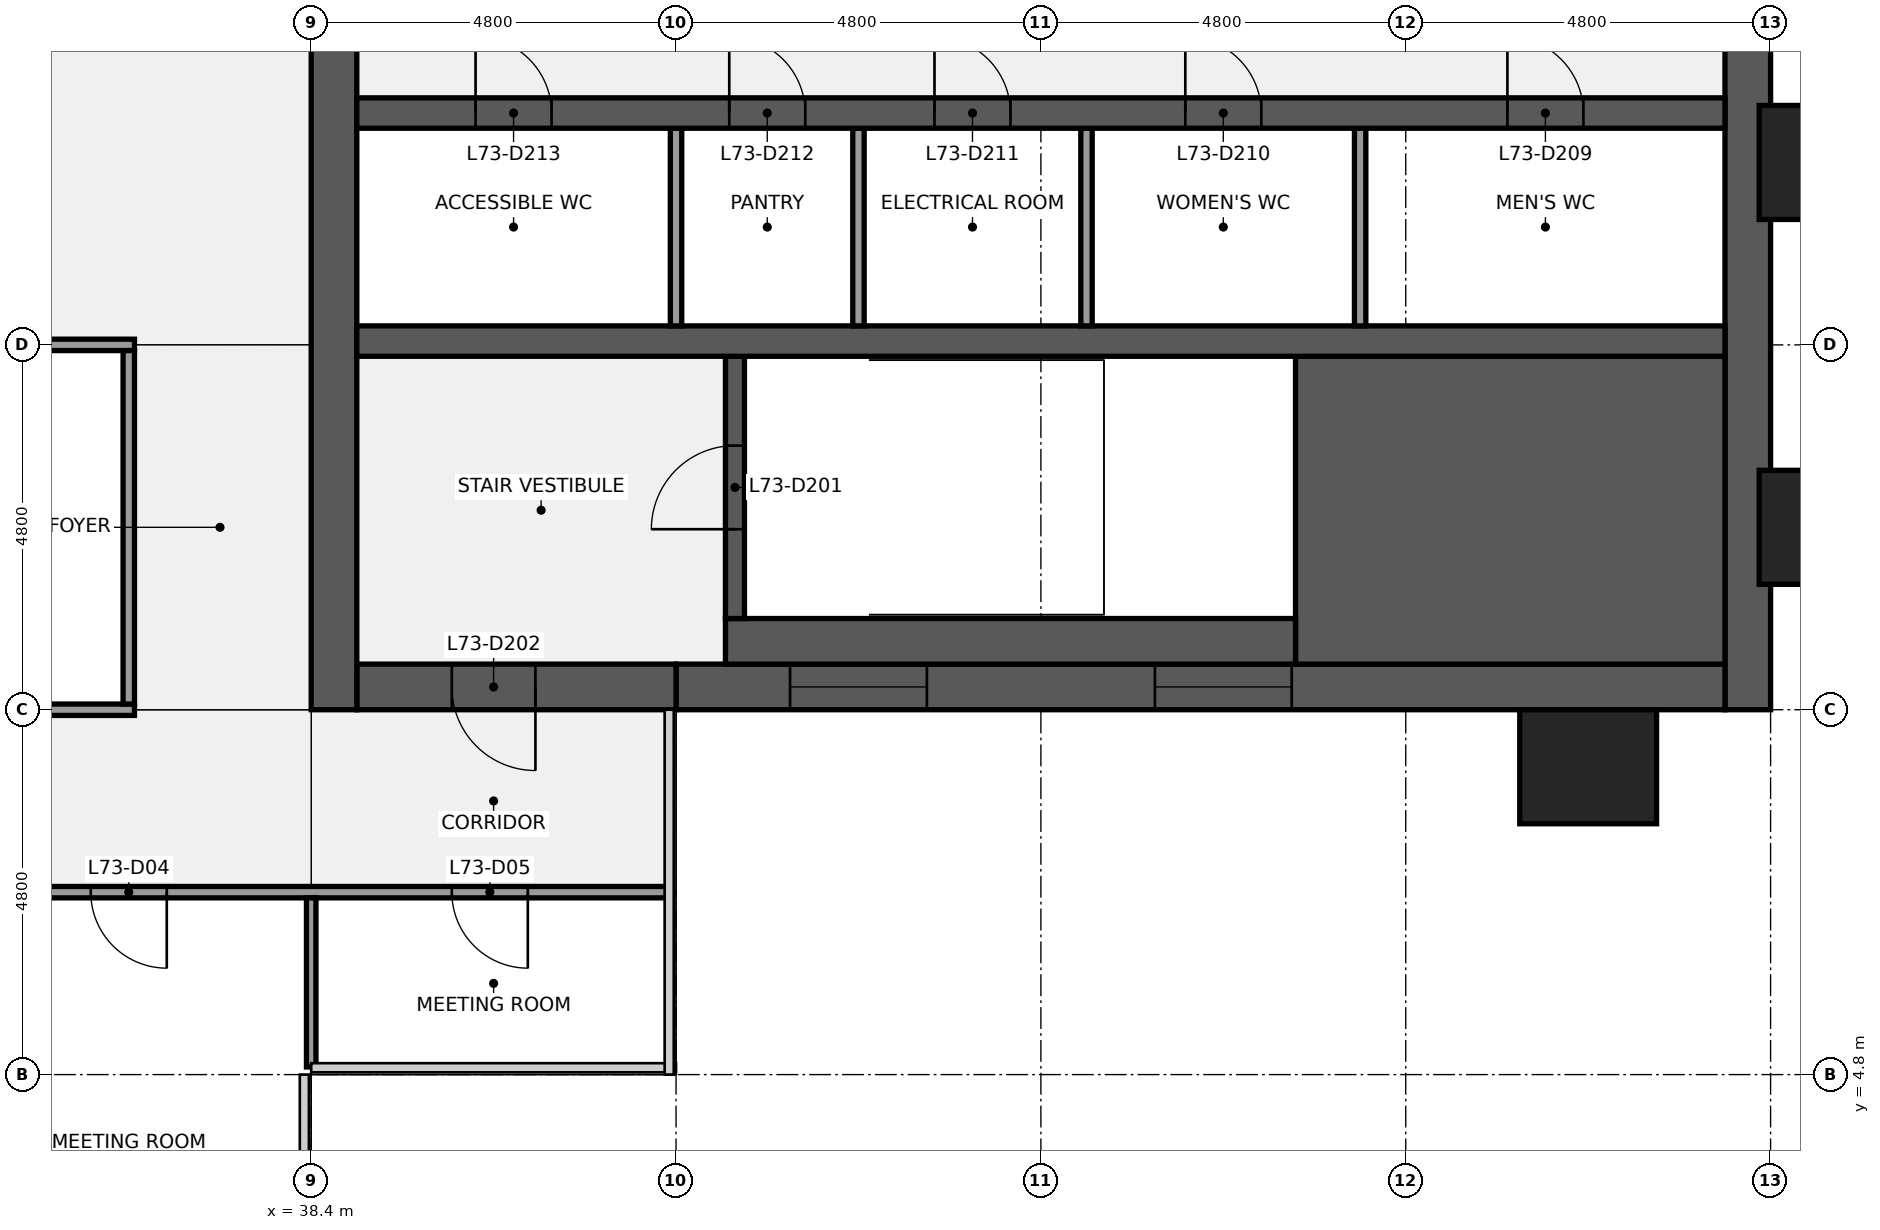
"""IFC4 building model, lengths in metres.
Left out: names, types, materials, properties, quantities, classifications, styles, units other than length and angle.
Written with IfcOpenShell. Run it as: python <this file> out.ifc"""

import sys

from ifc_helpers import new_model, si_unit, direction, frame, frame_2d, origin, origin_2d, place, context, subcontext, project, spatial, rectangle, extrude, element, fill, save


model = new_model("IFC4")
c1 = context("Model", 3, precision=1e-05, world=origin(), true_north=direction((0.0, 1.0)))
c2 = subcontext(c1, "Body", "Model", "MODEL_VIEW")
j1 = project(units=[si_unit("LENGTHUNIT", "METRE"), si_unit("PLANEANGLEUNIT", "RADIAN")], contexts=[c1])
p1 = place(None, origin())
s1 = spatial("IfcSite", under=j1, at=p1, CompositionType="ELEMENT")
p2 = place(p1, origin())
s2 = spatial("IfcBuilding", under=s1, at=p2, CompositionType="ELEMENT")
p3 = place(p2, frame((0.0, 0.0, 330.3)))
s3 = spatial("IfcBuildingStorey", under=s2, at=p3, CompositionType="ELEMENT", Elevation=330.3)
p4 = place(p3, frame((57.3, 38.4, 0.0), z_axis=(0.0, 0.0, 1.0), x_axis=(0.0, -1.0, 0.0)))
e1 = element("IfcWall", 1, at=p4, inside=s3, PredefinedType="SHEAR", context=c2, shape_type="SweptSolid", body=[
    extrude(rectangle(XDim=28.8, YDim=0.6, at=frame_2d((14.4, 0.0))), origin(), (0.0, 0.0, 1.0), 3.84),
])
p5 = place(p4, frame((18.45, 0.0, 0.9)))
e2 = element("IfcOpeningElement", 2, at=p5, cuts=e1, PredefinedType="OPENING", context=c2, shape_type="SweptSolid", body=[
    extrude(rectangle(XDim=1.5, YDim=1.5, at=frame_2d((0.75, 0.75))), frame((0.0, 0.31, 0.0), z_axis=(0.0, -1.0, 0.0), x_axis=(1.0, 0.0, 0.0)), (0.0, 0.0, 1.0), 0.62),
])
p6 = place(p4, frame((8.85, 0.0, 0.9)))
e3 = element("IfcOpeningElement", 3, at=p6, cuts=e1, PredefinedType="OPENING", context=c2, shape_type="SweptSolid", body=[
    extrude(rectangle(XDim=1.5, YDim=1.5, at=frame_2d((0.75, 0.75))), frame((0.0, 0.31, 0.0), z_axis=(0.0, -1.0, 0.0), x_axis=(1.0, 0.0, 0.0)), (0.0, 0.0, 1.0), 0.62),
])
p7 = place(p3, frame((57.0, 9.9, 0.0), z_axis=(0.0, 0.0, 1.0), x_axis=(-1.0, 0.0, 0.0)))
e4 = element("IfcWall", 4, at=p7, inside=s3, PredefinedType="SHEAR", context=c2, shape_type="SweptSolid", body=[
    extrude(rectangle(XDim=13.8, YDim=0.6, at=frame_2d((6.9, 0.0))), origin(), (0.0, 0.0, 1.0), 3.84),
])
p8 = place(p7, frame((5.7, 0.0, 0.9)))
e5 = element("IfcOpeningElement", 5, at=p8, cuts=e4, PredefinedType="OPENING", context=c2, shape_type="SweptSolid", body=[
    extrude(rectangle(XDim=1.8, YDim=1.5, at=frame_2d((0.9, 0.75))), frame((0.0, 0.31, 0.0), z_axis=(0.0, -1.0, 0.0), x_axis=(1.0, 0.0, 0.0)), (0.0, 0.0, 1.0), 0.62),
])
p9 = place(p7, frame((10.5, 0.0, 0.9)))
e6 = element("IfcOpeningElement", 6, at=p9, cuts=e4, PredefinedType="OPENING", context=c2, shape_type="SweptSolid", body=[
    extrude(rectangle(XDim=1.8, YDim=1.5, at=frame_2d((0.9, 0.75))), frame((0.0, 0.31, 0.0), z_axis=(0.0, -1.0, 0.0), x_axis=(1.0, 0.0, 0.0)), (0.0, 0.0, 1.0), 0.62),
])
p10 = place(p3, frame((43.2, 9.9, 0.0), z_axis=(0.0, 0.0, 1.0), x_axis=(-1.0, 0.0, 0.0)))
e7 = element("IfcWall", 7, at=p10, inside=s3, PredefinedType="SHEAR", context=c2, shape_type="SweptSolid", body=[
    extrude(rectangle(XDim=4.2, YDim=0.6, at=frame_2d((2.1, 0.0))), origin(), (0.0, 0.0, 1.0), 3.84),
])
p11 = place(p10, frame((1.85, 0.0, 0.0)))
e8 = element("IfcOpeningElement", 8, at=p11, cuts=e7, PredefinedType="OPENING", context=c2, shape_type="SweptSolid", body=[
    extrude(rectangle(XDim=1.1, YDim=2.1, at=frame_2d((0.55, 1.05))), frame((0.0, 0.31, 0.0), z_axis=(0.0, -1.0, 0.0), x_axis=(1.0, 0.0, 0.0)), (0.0, 0.0, 1.0), 0.62),
])
p12 = place(p3, frame((38.7, 9.6, 0.0), z_axis=(0.0, 0.0, 1.0), x_axis=(0.0, 1.0, 0.0)))
e9 = element("IfcWall", 9, at=p12, inside=s3, PredefinedType="SHEAR", context=c2, shape_type="SweptSolid", body=[
    extrude(rectangle(XDim=28.8, YDim=0.6, at=frame_2d((14.4, 0.0))), origin(), (0.0, 0.0, 1.0), 3.84),
])
p13 = place(p12, frame((8.7, 0.0, 0.0)))
e10 = element("IfcOpeningElement", 10, at=p13, cuts=e9, PredefinedType="OPENING", context=c2, shape_type="SweptSolid", body=[
    extrude(rectangle(XDim=1.8, YDim=2.1, at=frame_2d((0.9, 1.05))), frame((0.0, 0.31, 0.0), z_axis=(0.0, -1.0, 0.0), x_axis=(1.0, 0.0, 0.0)), (0.0, 0.0, 1.0), 0.62),
])
p14 = place(p12, frame((18.3, 0.0, 0.0)))
e11 = element("IfcOpeningElement", 11, at=p14, cuts=e9, PredefinedType="OPENING", context=c2, shape_type="SweptSolid", body=[
    extrude(rectangle(XDim=1.8, YDim=2.1, at=frame_2d((0.9, 1.05))), frame((0.0, 0.31, 0.0), z_axis=(0.0, -1.0, 0.0), x_axis=(1.0, 0.0, 0.0)), (0.0, 0.0, 1.0), 0.62),
])
p15 = place(p3, frame((51.35, 12.225, 0.0), z_axis=(0.0, 0.0, 1.0), x_axis=(1.0, 0.0, 0.0)))
e12 = element("IfcWall", 12, at=p15, inside=s3, PredefinedType="SHEAR", context=c2, shape_type="SweptSolid", body=[
    extrude(rectangle(XDim=5.65, YDim=4.05, at=frame_2d((2.825, 0.0))), origin(), (0.0, 0.0, 1.0), 3.84),
])
p16 = place(p3, frame((43.85, 10.5, 0.0), z_axis=(0.0, 0.0, 1.0), x_axis=(1.0, 0.0, 0.0)))
e13 = element("IfcWall", 13, at=p16, inside=s3, PredefinedType="SHEAR", context=c2, shape_type="SweptSolid", body=[
    extrude(rectangle(XDim=7.5, YDim=0.6, at=frame_2d((3.75, 0.0))), origin(), (0.0, 0.0, 1.0), 3.84),
])
p17 = place(p3, frame((43.975, 10.8, 0.0), z_axis=(0.0, 0.0, 1.0), x_axis=(0.0, 1.0, 0.0)))
e14 = element("IfcWall", 14, at=p17, inside=s3, PredefinedType="SHEAR", context=c2, shape_type="SweptSolid", body=[
    extrude(rectangle(XDim=3.45, YDim=0.25, at=frame_2d((1.725, 0.0))), origin(), (0.0, 0.0, 1.0), 3.84),
])
p18 = place(p17, frame((1.175, 0.0, 0.0)))
e15 = element("IfcOpeningElement", 15, at=p18, cuts=e14, PredefinedType="OPENING", context=c2, shape_type="SweptSolid", body=[
    extrude(rectangle(XDim=1.1, YDim=2.1, at=frame_2d((0.55, 1.05))), frame((0.0, 0.135, 0.0), z_axis=(0.0, -1.0, 0.0), x_axis=(1.0, 0.0, 0.0)), (0.0, 0.0, 1.0), 0.27),
])
p19 = place(p3, frame((39.0, 14.45, 0.0), z_axis=(0.0, 0.0, 1.0), x_axis=(1.0, 0.0, 0.0)))
e16 = element("IfcWall", 16, at=p19, inside=s3, PredefinedType="SHEAR", context=c2, shape_type="SweptSolid", body=[
    extrude(rectangle(XDim=18.0, YDim=0.4, at=frame_2d((9.0, 0.0))), origin(), (0.0, 0.0, 1.0), 3.84),
])
for number, where, z_axis, x_axis in (
    (17, (52.2, 14.65, 0.0), (0.0, 0.0, 1.0), (0.0, 1.0, 0.0)),
    (18, (48.6, 14.65, 0.0), (0.0, 0.0, 1.0), (0.0, 1.0, 0.0)),
    (19, (45.6, 14.65, 0.0), (0.0, 0.0, 1.0), (0.0, 1.0, 0.0)),
    (20, (43.2, 14.65, 0.0), (0.0, 0.0, 1.0), (0.0, 1.0, 0.0)),
):
    element("IfcWall", number, at=place(p3, frame(where, z_axis=z_axis, x_axis=x_axis)), inside=s3, PredefinedType="PARTITIONING", context=c2, shape_type="SweptSolid", body=[
        extrude(rectangle(XDim=2.6, YDim=0.15, at=frame_2d((1.3, 0.0))), origin(), (0.0, 0.0, 1.0), 3.84),
    ])
p20 = place(p3, frame((39.0, 17.45, 0.0), z_axis=(0.0, 0.0, 1.0), x_axis=(1.0, 0.0, 0.0)))
e21 = element("IfcWall", 21, at=p20, inside=s3, PredefinedType="SHEAR", context=c2, shape_type="SweptSolid", body=[
    extrude(rectangle(XDim=18.0, YDim=0.4, at=frame_2d((9.0, 0.0))), origin(), (0.0, 0.0, 1.0), 3.84),
])
p21 = place(p20, frame((15.137, 0.0, 0.0)))
e22 = element("IfcOpeningElement", 22, at=p21, cuts=e21, PredefinedType="OPENING", context=c2, shape_type="SweptSolid", body=[
    extrude(rectangle(XDim=1.0, YDim=2.1, at=frame_2d((0.5, 1.05))), frame((0.0, 0.21, 0.0), z_axis=(0.0, -1.0, 0.0), x_axis=(1.0, 0.0, 0.0)), (0.0, 0.0, 1.0), 0.42),
])
p22 = place(p20, frame((10.9, 0.0, 0.0)))
e23 = element("IfcOpeningElement", 23, at=p22, cuts=e21, PredefinedType="OPENING", context=c2, shape_type="SweptSolid", body=[
    extrude(rectangle(XDim=1.0, YDim=2.1, at=frame_2d((0.5, 1.05))), frame((0.0, 0.21, 0.0), z_axis=(0.0, -1.0, 0.0), x_axis=(1.0, 0.0, 0.0)), (0.0, 0.0, 1.0), 0.42),
])
p23 = place(p20, frame((7.6, 0.0, 0.0)))
e24 = element("IfcOpeningElement", 24, at=p23, cuts=e21, PredefinedType="OPENING", context=c2, shape_type="SweptSolid", body=[
    extrude(rectangle(XDim=1.0, YDim=2.1, at=frame_2d((0.5, 1.05))), frame((0.0, 0.21, 0.0), z_axis=(0.0, -1.0, 0.0), x_axis=(1.0, 0.0, 0.0)), (0.0, 0.0, 1.0), 0.42),
])
p24 = place(p20, frame((4.9, 0.0, 0.0)))
e25 = element("IfcOpeningElement", 25, at=p24, cuts=e21, PredefinedType="OPENING", context=c2, shape_type="SweptSolid", body=[
    extrude(rectangle(XDim=1.0, YDim=2.1, at=frame_2d((0.5, 1.05))), frame((0.0, 0.21, 0.0), z_axis=(0.0, -1.0, 0.0), x_axis=(1.0, 0.0, 0.0)), (0.0, 0.0, 1.0), 0.42),
])
p25 = place(p20, frame((1.562, 0.0, 0.0)))
e26 = element("IfcOpeningElement", 26, at=p25, cuts=e21, PredefinedType="OPENING", context=c2, shape_type="SweptSolid", body=[
    extrude(rectangle(XDim=1.0, YDim=2.1, at=frame_2d((0.5, 1.05))), frame((0.0, 0.21, 0.0), z_axis=(0.0, -1.0, 0.0), x_axis=(1.0, 0.0, 0.0)), (0.0, 0.0, 1.0), 0.42),
])
p26 = place(p3, frame((14.5, 7.2, 0.0), z_axis=(0.0, 0.0, 1.0), x_axis=(1.0, 0.0, 0.0)))
e27 = element("IfcWall", 27, at=p26, inside=s3, PredefinedType="PARTITIONING", context=c2, shape_type="SweptSolid", body=[
    extrude(rectangle(XDim=28.6, YDim=0.15, at=frame_2d((14.3, 0.0))), origin(), (0.0, 0.0, 1.0), 2.87),
])
p27 = place(p26, frame((1.85, 0.0, 0.0)))
e28 = element("IfcOpeningElement", 28, at=p27, cuts=e27, PredefinedType="OPENING", context=c2, shape_type="SweptSolid", body=[
    extrude(rectangle(XDim=1.0, YDim=2.1, at=frame_2d((0.5, 1.05))), frame((0.0, 0.085, 0.0), z_axis=(0.0, -1.0, 0.0), x_axis=(1.0, 0.0, 0.0)), (0.0, 0.0, 1.0), 0.17),
])
p28 = place(p26, frame((6.6, 0.0, 0.0)))
e29 = element("IfcOpeningElement", 29, at=p28, cuts=e27, PredefinedType="OPENING", context=c2, shape_type="SweptSolid", body=[
    extrude(rectangle(XDim=1.0, YDim=2.1, at=frame_2d((0.5, 1.05))), frame((0.0, 0.085, 0.0), z_axis=(0.0, -1.0, 0.0), x_axis=(1.0, 0.0, 0.0)), (0.0, 0.0, 1.0), 0.17),
])
p29 = place(p26, frame((13.8, 0.0, 0.0)))
e30 = element("IfcOpeningElement", 30, at=p29, cuts=e27, PredefinedType="OPENING", context=c2, shape_type="SweptSolid", body=[
    extrude(rectangle(XDim=1.0, YDim=2.1, at=frame_2d((0.5, 1.05))), frame((0.0, 0.085, 0.0), z_axis=(0.0, -1.0, 0.0), x_axis=(1.0, 0.0, 0.0)), (0.0, 0.0, 1.0), 0.17),
])
p30 = place(p26, frame((21.0, 0.0, 0.0)))
e31 = element("IfcOpeningElement", 31, at=p30, cuts=e27, PredefinedType="OPENING", context=c2, shape_type="SweptSolid", body=[
    extrude(rectangle(XDim=1.0, YDim=2.1, at=frame_2d((0.5, 1.05))), frame((0.0, 0.085, 0.0), z_axis=(0.0, -1.0, 0.0), x_axis=(1.0, 0.0, 0.0)), (0.0, 0.0, 1.0), 0.17),
])
p31 = place(p26, frame((25.75, 0.0, 0.0)))
e32 = element("IfcOpeningElement", 32, at=p31, cuts=e27, PredefinedType="OPENING", context=c2, shape_type="SweptSolid", body=[
    extrude(rectangle(XDim=1.0, YDim=2.1, at=frame_2d((0.5, 1.05))), frame((0.0, 0.085, 0.0), z_axis=(0.0, -1.0, 0.0), x_axis=(1.0, 0.0, 0.0)), (0.0, 0.0, 1.0), 0.17),
])
p32 = place(p3, frame((21.525, 9.6, 0.0), z_axis=(0.0, 0.0, 1.0), x_axis=(1.0, 0.0, 0.0)))
e33 = element("IfcWall", 33, at=p32, inside=s3, PredefinedType="PARTITIONING", context=c2, shape_type="SweptSolid", body=[
    extrude(rectangle(XDim=14.55, YDim=0.15, at=frame_2d((7.275, 0.0))), origin(), (0.0, 0.0, 1.0), 2.87),
])
p33 = place(p32, frame((3.175, 0.0, 0.0)))
e34 = element("IfcOpeningElement", 34, at=p33, cuts=e33, PredefinedType="OPENING", context=c2, shape_type="SweptSolid", body=[
    extrude(rectangle(XDim=1.0, YDim=2.1, at=frame_2d((0.5, 1.05))), frame((0.0, 0.085, 0.0), z_axis=(0.0, -1.0, 0.0), x_axis=(1.0, 0.0, 0.0)), (0.0, 0.0, 1.0), 0.17),
])
p34 = place(p32, frame((10.375, 0.0, 0.0)))
e35 = element("IfcOpeningElement", 35, at=p34, cuts=e33, PredefinedType="OPENING", context=c2, shape_type="SweptSolid", body=[
    extrude(rectangle(XDim=1.0, YDim=2.1, at=frame_2d((0.5, 1.05))), frame((0.0, 0.085, 0.0), z_axis=(0.0, -1.0, 0.0), x_axis=(1.0, 0.0, 0.0)), (0.0, 0.0, 1.0), 0.17),
])
p35 = place(p3, frame((33.675, 14.4, 0.0), z_axis=(0.0, 0.0, 1.0), x_axis=(1.0, 0.0, 0.0)))
e36 = element("IfcWall", 36, at=p35, inside=s3, PredefinedType="PARTITIONING", context=c2, shape_type="SweptSolid", body=[
    extrude(rectangle(XDim=2.4, YDim=0.15, at=frame_2d((1.2, 0.0))), origin(), (0.0, 0.0, 1.0), 2.87),
])
p36 = place(p3, frame((36.0, 9.675, 0.0), z_axis=(0.0, 0.0, 1.0), x_axis=(0.0, 1.0, 0.0)))
e37 = element("IfcWall", 37, at=p36, inside=s3, PredefinedType="PARTITIONING", context=c2, shape_type="SweptSolid", body=[
    extrude(rectangle(XDim=4.65, YDim=0.15, at=frame_2d((2.325, 0.0))), origin(), (0.0, 0.0, 1.0), 2.87),
])
p37 = place(p3, frame((38.4, 4.9, 0.0), z_axis=(0.0, 0.0, 1.0), x_axis=(0.0, 1.0, 0.0)))
e38 = element("IfcWall", 38, at=p37, inside=s3, PredefinedType="PARTITIONING", context=c2, shape_type="SweptSolid", body=[
    extrude(rectangle(XDim=2.225, YDim=0.125, at=frame_2d((1.113, 0.0))), origin(), (0.0, 0.0, 1.0), 2.87),
])
for number, where, z_axis, x_axis in (
    (39, (55.2, 8.85, 0.0), (0.0, 0.0, 1.0), (1.0, 0.0, 0.0)),
    (40, (58.35, 12.0, 0.0), (0.0, 0.0, 1.0), (0.0, 1.0, 0.0)),
    (41, (58.35, 16.8, 0.0), (0.0, 0.0, 1.0), (0.0, 1.0, 0.0)),
):
    element("IfcColumn", number, at=place(p3, frame(where, z_axis=z_axis, x_axis=x_axis)), inside=s3, PredefinedType="PILASTER", context=c2, shape_type="SweptSolid", body=[
        extrude(rectangle(XDim=1.8, YDim=1.5, at=origin_2d()), origin(), (0.0, 0.0, 1.0), 4.0),
    ])
p38 = place(p18, origin())
e42 = element("IfcDoor", 42, at=p38, inside=s3, OperationType="SINGLE_SWING_LEFT", PredefinedType="DOOR", context=c2, shape_type="SweptSolid", body=[
    extrude(rectangle(XDim=1.1, YDim=2.1, at=frame_2d((0.55, 1.05))), frame((0.0, 0.025, 0.0), z_axis=(0.0, -1.0, 0.0), x_axis=(1.0, 0.0, 0.0)), (0.0, 0.0, 1.0), 0.05),
])
fill(e15, e42)
p39 = place(p11, origin())
e43 = element("IfcDoor", 43, at=p39, inside=s3, OperationType="SINGLE_SWING_LEFT", PredefinedType="DOOR", context=c2, shape_type="SweptSolid", body=[
    extrude(rectangle(XDim=1.1, YDim=2.1, at=frame_2d((0.55, 1.05))), frame((0.0, 0.025, 0.0), z_axis=(0.0, -1.0, 0.0), x_axis=(1.0, 0.0, 0.0)), (0.0, 0.0, 1.0), 0.05),
])
fill(e8, e43)
p40 = place(p21, origin())
e44 = element("IfcDoor", 44, at=p40, inside=s3, OperationType="SINGLE_SWING_LEFT", PredefinedType="DOOR", context=c2, shape_type="SweptSolid", body=[
    extrude(rectangle(XDim=1.0, YDim=2.1, at=frame_2d((0.5, 1.05))), frame((0.0, 0.025, 0.0), z_axis=(0.0, -1.0, 0.0), x_axis=(1.0, 0.0, 0.0)), (0.0, 0.0, 1.0), 0.05),
])
fill(e22, e44)
p41 = place(p22, origin())
e45 = element("IfcDoor", 45, at=p41, inside=s3, OperationType="SINGLE_SWING_LEFT", PredefinedType="DOOR", context=c2, shape_type="SweptSolid", body=[
    extrude(rectangle(XDim=1.0, YDim=2.1, at=frame_2d((0.5, 1.05))), frame((0.0, 0.025, 0.0), z_axis=(0.0, -1.0, 0.0), x_axis=(1.0, 0.0, 0.0)), (0.0, 0.0, 1.0), 0.05),
])
fill(e23, e45)
p42 = place(p23, origin())
e46 = element("IfcDoor", 46, at=p42, inside=s3, OperationType="SINGLE_SWING_LEFT", PredefinedType="DOOR", context=c2, shape_type="SweptSolid", body=[
    extrude(rectangle(XDim=1.0, YDim=2.1, at=frame_2d((0.5, 1.05))), frame((0.0, 0.025, 0.0), z_axis=(0.0, -1.0, 0.0), x_axis=(1.0, 0.0, 0.0)), (0.0, 0.0, 1.0), 0.05),
])
fill(e24, e46)
p43 = place(p24, origin())
e47 = element("IfcDoor", 47, at=p43, inside=s3, OperationType="SINGLE_SWING_LEFT", PredefinedType="DOOR", context=c2, shape_type="SweptSolid", body=[
    extrude(rectangle(XDim=1.0, YDim=2.1, at=frame_2d((0.5, 1.05))), frame((0.0, 0.025, 0.0), z_axis=(0.0, -1.0, 0.0), x_axis=(1.0, 0.0, 0.0)), (0.0, 0.0, 1.0), 0.05),
])
fill(e25, e47)
p44 = place(p25, origin())
e48 = element("IfcDoor", 48, at=p44, inside=s3, OperationType="SINGLE_SWING_LEFT", PredefinedType="DOOR", context=c2, shape_type="SweptSolid", body=[
    extrude(rectangle(XDim=1.0, YDim=2.1, at=frame_2d((0.5, 1.05))), frame((0.0, 0.025, 0.0), z_axis=(0.0, -1.0, 0.0), x_axis=(1.0, 0.0, 0.0)), (0.0, 0.0, 1.0), 0.05),
])
fill(e26, e48)
p45 = place(p8, origin())
e49 = element("IfcWindow", 49, at=p45, inside=s3, PartitioningType="SINGLE_PANEL", PredefinedType="WINDOW", context=c2, shape_type="SweptSolid", body=[
    extrude(rectangle(XDim=1.8, YDim=1.5, at=frame_2d((0.9, 0.75))), frame((0.0, 0.03, 0.0), z_axis=(0.0, -1.0, 0.0), x_axis=(1.0, 0.0, 0.0)), (0.0, 0.0, 1.0), 0.06),
])
fill(e5, e49)
p46 = place(p9, origin())
e50 = element("IfcWindow", 50, at=p46, inside=s3, PartitioningType="SINGLE_PANEL", PredefinedType="WINDOW", context=c2, shape_type="SweptSolid", body=[
    extrude(rectangle(XDim=1.8, YDim=1.5, at=frame_2d((0.9, 0.75))), frame((0.0, 0.03, 0.0), z_axis=(0.0, -1.0, 0.0), x_axis=(1.0, 0.0, 0.0)), (0.0, 0.0, 1.0), 0.06),
])
fill(e6, e50)
p47 = place(p30, origin())
e51 = element("IfcDoor", 51, at=p47, inside=s3, OperationType="SINGLE_SWING_RIGHT", PredefinedType="DOOR", context=c2, shape_type="SweptSolid", body=[
    extrude(rectangle(XDim=1.0, YDim=2.1, at=frame_2d((0.5, 1.05))), frame((0.0, 0.025, 0.0), z_axis=(0.0, -1.0, 0.0), x_axis=(1.0, 0.0, 0.0)), (0.0, 0.0, 1.0), 0.05),
])
fill(e31, e51)
p48 = place(p31, origin())
e52 = element("IfcDoor", 52, at=p48, inside=s3, OperationType="SINGLE_SWING_RIGHT", PredefinedType="DOOR", context=c2, shape_type="SweptSolid", body=[
    extrude(rectangle(XDim=1.0, YDim=2.1, at=frame_2d((0.5, 1.05))), frame((0.0, 0.025, 0.0), z_axis=(0.0, -1.0, 0.0), x_axis=(1.0, 0.0, 0.0)), (0.0, 0.0, 1.0), 0.05),
])
fill(e32, e52)
save(model, sys.argv[1])
